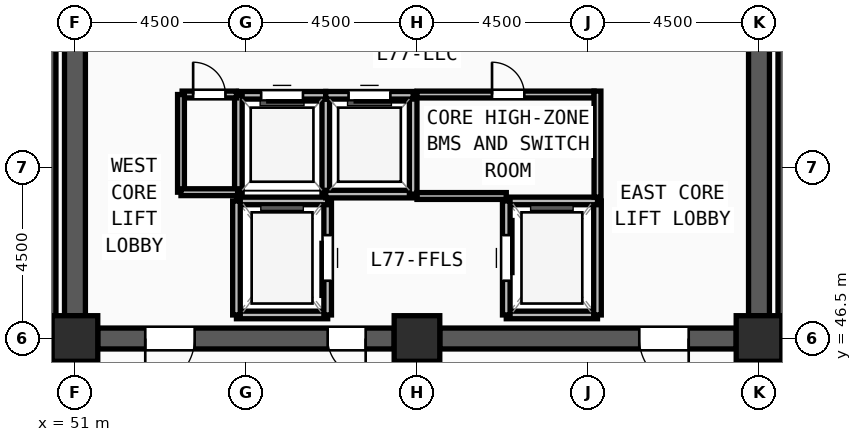
"""IFC4 building model, lengths in metres.
Left out: names, types, materials, properties, quantities, classifications, styles, units other than length and angle.
Written with IfcOpenShell. Run it as: python <this file> out.ifc"""

import sys

from ifc_helpers import new_model, si_unit, direction, frame, frame_2d, origin, origin_2d, place, context, subcontext, project, spatial, rectangle, extrude, source, transform, mapped, element, fill, save


model = new_model("IFC4")
c1 = context("Model", 3, precision=1e-05, world=origin(), true_north=direction((0.0, 1.0)))
c2 = subcontext(c1, "Body", "Model", "MODEL_VIEW")
j1 = project(units=[si_unit("LENGTHUNIT", "METRE"), si_unit("PLANEANGLEUNIT", "RADIAN")], contexts=[c1])
p1 = place(None, origin())
s1 = spatial("IfcSite", under=j1, at=p1, CompositionType="ELEMENT")
p2 = place(p1, origin())
s2 = spatial("IfcBuilding", under=s1, at=p2, CompositionType="ELEMENT")
p3 = place(p2, frame((0.0, 0.0, 297.75)))
s3 = spatial("IfcBuildingStorey", under=s2, at=p3, CompositionType="ELEMENT", Elevation=297.75)
m1 = source(origin(), c2, "Body", "SweptSolid", [
    extrude(rectangle(XDim=1.2, YDim=1.2, at=origin_2d()), origin(), (0.0, 0.0, 1.0), 3.75),
])
for number, where, z_axis, x_axis in (
    (1, (51.0, 46.5, 0.0), (0.0, 0.0, 1.0), (1.0, 0.0, 0.0)),
    (2, (60.0, 46.5, 0.0), (0.0, 0.0, 1.0), (1.0, 0.0, 0.0)),
    (3, (69.0, 46.5, 0.0), (0.0, 0.0, 1.0), (1.0, 0.0, 0.0)),
):
    element("IfcColumn", number, at=place(p3, frame(where, z_axis=z_axis, x_axis=x_axis)), inside=s3, PredefinedType="COLUMN", context=c2, shape_type="MappedRepresentation", body=[
        mapped(m1, transform((0.0, 0.0, 0.0), x_axis=(1.0, 0.0, 0.0), y_axis=(0.0, 1.0, 0.0), z_axis=(0.0, 0.0, 1.0), scale=1.0)),
    ])
p4 = place(p3, frame((69.0, 60.9, 0.0), z_axis=(0.0, 0.0, 1.0), x_axis=(0.0, -1.0, 0.0)))
e4 = element("IfcWall", 4, at=p4, inside=s3, PredefinedType="SHEAR", context=c2, shape_type="SweptSolid", body=[
    extrude(rectangle(XDim=13.8, YDim=0.55, at=frame_2d((6.9, 0.0))), origin(), (0.0, 0.0, 1.0), 3.57),
])
m2 = source(origin(), c2, "Body", "SweptSolid", [
    extrude(rectangle(XDim=1.2, YDim=2.2, at=frame_2d((0.6, 1.1))), frame((0.0, 0.285, 0.0), z_axis=(0.0, -1.0, 0.0), x_axis=(1.0, 0.0, 0.0)), (0.0, 0.0, 1.0), 0.57),
])
p5 = place(p4, frame((1.35, 0.0, 0.0)))
e5 = element("IfcOpeningElement", 5, at=p5, cuts=e4, PredefinedType="OPENING", context=c2, shape_type="MappedRepresentation", body=[
    mapped(m2, transform((0.0, 0.0, 0.0), x_axis=(1.0, 0.0, 0.0), y_axis=(0.0, 1.0, 0.0), z_axis=(0.0, 0.0, 1.0), scale=1.0)),
])
p6 = place(p3, frame((68.4, 46.5, 0.0), z_axis=(0.0, 0.0, 1.0), x_axis=(-1.0, 0.0, 0.0)))
e6 = element("IfcWall", 6, at=p6, inside=s3, PredefinedType="SHEAR", context=c2, shape_type="SweptSolid", body=[
    extrude(rectangle(XDim=7.8, YDim=0.55, at=frame_2d((3.9, 0.0))), origin(), (0.0, 0.0, 1.0), 3.57),
])
m3 = source(origin(), c2, "Body", "SweptSolid", [
    extrude(rectangle(XDim=1.3, YDim=2.2, at=frame_2d((0.65, 1.1))), frame((0.0, 0.285, 0.0), z_axis=(0.0, -1.0, 0.0), x_axis=(1.0, 0.0, 0.0)), (0.0, 0.0, 1.0), 0.57),
])
p7 = place(p6, frame((1.25, 0.0, 0.0)))
e7 = element("IfcOpeningElement", 7, at=p7, cuts=e6, PredefinedType="OPENING", context=c2, shape_type="MappedRepresentation", body=[
    mapped(m3, transform((0.0, 0.0, 0.0), x_axis=(1.0, 0.0, 0.0), y_axis=(0.0, 1.0, 0.0), z_axis=(0.0, 0.0, 1.0), scale=1.0)),
])
p8 = place(p3, frame((59.4, 46.5, 0.0), z_axis=(0.0, 0.0, 1.0), x_axis=(-1.0, 0.0, 0.0)))
e8 = element("IfcWall", 8, at=p8, inside=s3, PredefinedType="SHEAR", context=c2, shape_type="SweptSolid", body=[
    extrude(rectangle(XDim=7.8, YDim=0.55, at=frame_2d((3.9, 0.0))), origin(), (0.0, 0.0, 1.0), 3.57),
])
p9 = place(p8, frame((5.25, 0.0, 0.0)))
e9 = element("IfcOpeningElement", 9, at=p9, cuts=e8, PredefinedType="OPENING", context=c2, shape_type="MappedRepresentation", body=[
    mapped(m3, transform((0.0, 0.0, 0.0), x_axis=(1.0, 0.0, 0.0), y_axis=(0.0, 1.0, 0.0), z_axis=(0.0, 0.0, 1.0), scale=1.0)),
])
m4 = source(origin(), c2, "Body", "SweptSolid", [
    extrude(rectangle(XDim=1.0, YDim=2.2, at=frame_2d((0.5, 1.1))), frame((0.0, 0.285, 0.0), z_axis=(0.0, -1.0, 0.0), x_axis=(1.0, 0.0, 0.0)), (0.0, 0.0, 1.0), 0.57),
])
p10 = place(p8, frame((0.75, 0.0, 0.0)))
e10 = element("IfcOpeningElement", 10, at=p10, cuts=e8, PredefinedType="OPENING", context=c2, shape_type="MappedRepresentation", body=[
    mapped(m4, transform((0.0, 0.0, 0.0), x_axis=(1.0, 0.0, 0.0), y_axis=(0.0, 1.0, 0.0), z_axis=(0.0, 0.0, 1.0), scale=1.0)),
])
p11 = place(p3, frame((51.0, 47.1, 0.0), z_axis=(0.0, 0.0, 1.0), x_axis=(0.0, 1.0, 0.0)))
e11 = element("IfcWall", 11, at=p11, inside=s3, PredefinedType="SHEAR", context=c2, shape_type="SweptSolid", body=[
    extrude(rectangle(XDim=13.8, YDim=0.55, at=frame_2d((6.9, 0.0))), origin(), (0.0, 0.0, 1.0), 3.57),
])
for number, where, z_axis, x_axis in (
    (12, (50.38, 46.7, 0.0), (0.0, 0.0, 1.0), (0.0, 1.0, 0.0)),
    (13, (69.62, 54.52, 0.0), (0.0, 0.0, 1.0), (0.0, -1.0, 0.0)),
):
    element("IfcWall", number, at=place(p3, frame(where, z_axis=z_axis, x_axis=x_axis)), inside=s3, PredefinedType="SOLIDWALL", context=c2, shape_type="SweptSolid", body=[
        extrude(rectangle(XDim=7.82, YDim=0.24, at=frame_2d((3.91, 0.0))), origin(), (0.0, 0.0, 1.0), 3.57),
    ])
p12 = place(p3, frame((55.25, 47.12, 0.0), z_axis=(0.0, 0.0, 1.0), x_axis=(1.0, 0.0, 0.0)))
e14 = element("IfcWall", 14, at=p12, inside=s3, PredefinedType="SOLIDWALL", context=c2, shape_type="SweptSolid", body=[
    extrude(rectangle(XDim=2.4, YDim=0.2, at=frame_2d((1.2, 0.0))), origin(), (0.0, 0.0, 1.0), 3.57),
])
p13 = place(p3, frame((57.65, 47.12, 0.0), z_axis=(0.0, 0.0, 1.0), x_axis=(0.0, 1.0, 0.0)))
e15 = element("IfcWall", 15, at=p13, inside=s3, PredefinedType="SOLIDWALL", context=c2, shape_type="SweptSolid", body=[
    extrude(rectangle(XDim=3.0, YDim=0.2, at=frame_2d((1.5, 0.0))), origin(), (0.0, 0.0, 1.0), 3.57),
])
m5 = source(origin(), c2, "Body", "SweptSolid", [
    extrude(rectangle(XDim=1.2, YDim=2.3, at=frame_2d((0.6, 1.15))), frame((0.0, 0.11, 0.0), z_axis=(0.0, -1.0, 0.0), x_axis=(1.0, 0.0, 0.0)), (0.0, 0.0, 1.0), 0.22),
])
p14 = place(p13, frame((0.9, 0.0, 0.0)))
e16 = element("IfcOpeningElement", 16, at=p14, cuts=e15, PredefinedType="OPENING", context=c2, shape_type="MappedRepresentation", body=[
    mapped(m5, transform((0.0, 0.0, 0.0), x_axis=(1.0, 0.0, 0.0), y_axis=(0.0, 1.0, 0.0), z_axis=(0.0, 0.0, 1.0), scale=1.0)),
])
p15 = place(p3, frame((57.65, 50.12, 0.0), z_axis=(0.0, 0.0, 1.0), x_axis=(-1.0, 0.0, 0.0)))
e17 = element("IfcWall", 17, at=p15, inside=s3, PredefinedType="SOLIDWALL", context=c2, shape_type="SweptSolid", body=[
    extrude(rectangle(XDim=2.4, YDim=0.2, at=frame_2d((1.2, 0.0))), origin(), (0.0, 0.0, 1.0), 3.57),
])
p16 = place(p3, frame((55.25, 50.12, 0.0), z_axis=(0.0, 0.0, 1.0), x_axis=(0.0, -1.0, 0.0)))
e18 = element("IfcWall", 18, at=p16, inside=s3, PredefinedType="SOLIDWALL", context=c2, shape_type="SweptSolid", body=[
    extrude(rectangle(XDim=3.0, YDim=0.2, at=frame_2d((1.5, 0.0))), origin(), (0.0, 0.0, 1.0), 3.57),
])
p17 = place(p3, frame((62.35, 47.12, 0.0), z_axis=(0.0, 0.0, 1.0), x_axis=(1.0, 0.0, 0.0)))
e19 = element("IfcWall", 19, at=p17, inside=s3, PredefinedType="SOLIDWALL", context=c2, shape_type="SweptSolid", body=[
    extrude(rectangle(XDim=2.4, YDim=0.2, at=frame_2d((1.2, 0.0))), origin(), (0.0, 0.0, 1.0), 3.57),
])
p18 = place(p3, frame((64.75, 47.12, 0.0), z_axis=(0.0, 0.0, 1.0), x_axis=(0.0, 1.0, 0.0)))
e20 = element("IfcWall", 20, at=p18, inside=s3, PredefinedType="SOLIDWALL", context=c2, shape_type="SweptSolid", body=[
    extrude(rectangle(XDim=3.0, YDim=0.2, at=frame_2d((1.5, 0.0))), origin(), (0.0, 0.0, 1.0), 3.57),
])
p19 = place(p3, frame((64.75, 50.12, 0.0), z_axis=(0.0, 0.0, 1.0), x_axis=(-1.0, 0.0, 0.0)))
e21 = element("IfcWall", 21, at=p19, inside=s3, PredefinedType="SOLIDWALL", context=c2, shape_type="SweptSolid", body=[
    extrude(rectangle(XDim=2.4, YDim=0.2, at=frame_2d((1.2, 0.0))), origin(), (0.0, 0.0, 1.0), 3.57),
])
p20 = place(p3, frame((62.35, 50.12, 0.0), z_axis=(0.0, 0.0, 1.0), x_axis=(0.0, -1.0, 0.0)))
e22 = element("IfcWall", 22, at=p20, inside=s3, PredefinedType="SOLIDWALL", context=c2, shape_type="SweptSolid", body=[
    extrude(rectangle(XDim=3.0, YDim=0.2, at=frame_2d((1.5, 0.0))), origin(), (0.0, 0.0, 1.0), 3.57),
])
p21 = place(p20, frame((0.9, 0.0, 0.0)))
e23 = element("IfcOpeningElement", 23, at=p21, cuts=e22, PredefinedType="OPENING", context=c2, shape_type="MappedRepresentation", body=[
    mapped(m5, transform((0.0, 0.0, 0.0), x_axis=(1.0, 0.0, 0.0), y_axis=(0.0, 1.0, 0.0), z_axis=(0.0, 0.0, 1.0), scale=1.0)),
])
p22 = place(p3, frame((57.6, 50.3, 0.0), z_axis=(0.0, 0.0, 1.0), x_axis=(0.0, 1.0, 0.0)))
e24 = element("IfcWall", 24, at=p22, inside=s3, PredefinedType="SOLIDWALL", context=c2, shape_type="SweptSolid", body=[
    extrude(rectangle(XDim=2.6, YDim=0.2, at=frame_2d((1.3, 0.0))), origin(), (0.0, 0.0, 1.0), 3.57),
])
p23 = place(p3, frame((57.6, 52.9, 0.0), z_axis=(0.0, 0.0, 1.0), x_axis=(-1.0, 0.0, 0.0)))
e25 = element("IfcWall", 25, at=p23, inside=s3, PredefinedType="SOLIDWALL", context=c2, shape_type="SweptSolid", body=[
    extrude(rectangle(XDim=2.3, YDim=0.2, at=frame_2d((1.15, 0.0))), origin(), (0.0, 0.0, 1.0), 3.57),
])
m6 = source(origin(), c2, "Body", "SweptSolid", [
    extrude(rectangle(XDim=1.1, YDim=2.2, at=frame_2d((0.55, 1.1))), frame((0.0, 0.11, 0.0), z_axis=(0.0, -1.0, 0.0), x_axis=(1.0, 0.0, 0.0)), (0.0, 0.0, 1.0), 0.22),
])
p24 = place(p23, frame((0.6, 0.0, 0.0)))
e26 = element("IfcOpeningElement", 26, at=p24, cuts=e25, PredefinedType="OPENING", context=c2, shape_type="MappedRepresentation", body=[
    mapped(m6, transform((0.0, 0.0, 0.0), x_axis=(1.0, 0.0, 0.0), y_axis=(0.0, 1.0, 0.0), z_axis=(0.0, 0.0, 1.0), scale=1.0)),
])
p25 = place(p3, frame((55.3, 52.9, 0.0), z_axis=(0.0, 0.0, 1.0), x_axis=(0.0, -1.0, 0.0)))
e27 = element("IfcWall", 27, at=p25, inside=s3, PredefinedType="SOLIDWALL", context=c2, shape_type="SweptSolid", body=[
    extrude(rectangle(XDim=2.6, YDim=0.2, at=frame_2d((1.3, 0.0))), origin(), (0.0, 0.0, 1.0), 3.57),
])
p26 = place(p3, frame((57.6, 50.3, 0.0), z_axis=(0.0, 0.0, 1.0), x_axis=(1.0, 0.0, 0.0)))
e28 = element("IfcWall", 28, at=p26, inside=s3, PredefinedType="SOLIDWALL", context=c2, shape_type="SweptSolid", body=[
    extrude(rectangle(XDim=2.3, YDim=0.2, at=frame_2d((1.15, 0.0))), origin(), (0.0, 0.0, 1.0), 3.57),
])
p27 = place(p3, frame((59.9, 50.3, 0.0), z_axis=(0.0, 0.0, 1.0), x_axis=(0.0, 1.0, 0.0)))
e29 = element("IfcWall", 29, at=p27, inside=s3, PredefinedType="SOLIDWALL", context=c2, shape_type="SweptSolid", body=[
    extrude(rectangle(XDim=2.6, YDim=0.2, at=frame_2d((1.3, 0.0))), origin(), (0.0, 0.0, 1.0), 3.57),
])
p28 = place(p3, frame((59.9, 52.9, 0.0), z_axis=(0.0, 0.0, 1.0), x_axis=(-1.0, 0.0, 0.0)))
e30 = element("IfcWall", 30, at=p28, inside=s3, PredefinedType="SOLIDWALL", context=c2, shape_type="SweptSolid", body=[
    extrude(rectangle(XDim=2.3, YDim=0.2, at=frame_2d((1.15, 0.0))), origin(), (0.0, 0.0, 1.0), 3.57),
])
p29 = place(p28, frame((0.6, 0.0, 0.0)))
e31 = element("IfcOpeningElement", 31, at=p29, cuts=e30, PredefinedType="OPENING", context=c2, shape_type="MappedRepresentation", body=[
    mapped(m6, transform((0.0, 0.0, 0.0), x_axis=(1.0, 0.0, 0.0), y_axis=(0.0, 1.0, 0.0), z_axis=(0.0, 0.0, 1.0), scale=1.0)),
])
p30 = place(p3, frame((60.0, 52.92, 0.0), z_axis=(0.0, 0.0, 1.0), x_axis=(1.0, 0.0, 0.0)))
e32 = element("IfcWall", 32, at=p30, inside=s3, PredefinedType="PARTITIONING", context=c2, shape_type="SweptSolid", body=[
    extrude(rectangle(XDim=4.66, YDim=0.18, at=frame_2d((2.33, 0.0))), origin(), (0.0, 0.0, 1.0), 3.57),
])
m7 = source(origin(), c2, "Body", "SweptSolid", [
    extrude(rectangle(XDim=0.85, YDim=2.1, at=frame_2d((0.425, 1.05))), frame((0.0, 0.1, 0.0), z_axis=(0.0, -1.0, 0.0), x_axis=(1.0, 0.0, 0.0)), (0.0, 0.0, 1.0), 0.2),
])
p31 = place(p30, frame((1.975, 0.0, 0.0)))
e33 = element("IfcOpeningElement", 33, at=p31, cuts=e32, PredefinedType="OPENING", context=c2, shape_type="MappedRepresentation", body=[
    mapped(m7, transform((0.0, 0.0, 0.0), x_axis=(1.0, 0.0, 0.0), y_axis=(0.0, 1.0, 0.0), z_axis=(0.0, 0.0, 1.0), scale=1.0)),
])
p32 = place(p3, frame((53.82, 52.92, 0.0), z_axis=(0.0, 0.0, 1.0), x_axis=(1.0, 0.0, 0.0)))
e34 = element("IfcWall", 34, at=p32, inside=s3, PredefinedType="PARTITIONING", context=c2, shape_type="SweptSolid", body=[
    extrude(rectangle(XDim=1.43, YDim=0.18, at=frame_2d((0.715, 0.0))), origin(), (0.0, 0.0, 1.0), 3.57),
])
p33 = place(p32, frame((0.29, 0.0, 0.0)))
e35 = element("IfcOpeningElement", 35, at=p33, cuts=e34, PredefinedType="OPENING", context=c2, shape_type="MappedRepresentation", body=[
    mapped(m7, transform((0.0, 0.0, 0.0), x_axis=(1.0, 0.0, 0.0), y_axis=(0.0, 1.0, 0.0), z_axis=(0.0, 0.0, 1.0), scale=1.0)),
])
p34 = place(p3, frame((53.79, 50.35, 0.0), z_axis=(0.0, 0.0, 1.0), x_axis=(0.0, 1.0, 0.0)))
e36 = element("IfcWall", 36, at=p34, inside=s3, PredefinedType="PARTITIONING", context=c2, shape_type="SweptSolid", body=[
    extrude(rectangle(XDim=2.57, YDim=0.18, at=frame_2d((1.285, 0.0))), origin(), (0.0, 0.0, 1.0), 3.57),
])
p35 = place(p3, frame((53.79, 50.35, 0.0), z_axis=(0.0, 0.0, 1.0), x_axis=(1.0, 0.0, 0.0)))
e37 = element("IfcWall", 37, at=p35, inside=s3, PredefinedType="PARTITIONING", context=c2, shape_type="SweptSolid", body=[
    extrude(rectangle(XDim=1.49, YDim=0.18, at=frame_2d((0.745, 0.0))), origin(), (0.0, 0.0, 1.0), 3.57),
])
p36 = place(p3, frame((64.75, 50.22, 0.0), z_axis=(0.0, 0.0, 1.0), x_axis=(0.0, 1.0, 0.0)))
e38 = element("IfcWall", 38, at=p36, inside=s3, PredefinedType="PARTITIONING", context=c2, shape_type="SweptSolid", body=[
    extrude(rectangle(XDim=2.79, YDim=0.18, at=frame_2d((1.395, 0.0))), origin(), (0.0, 0.0, 1.0), 3.57),
])
p37 = place(p3, frame((60.0, 50.25, 0.0), z_axis=(0.0, 0.0, 1.0), x_axis=(1.0, 0.0, 0.0)))
e39 = element("IfcWall", 39, at=p37, inside=s3, PredefinedType="PARTITIONING", context=c2, shape_type="SweptSolid", body=[
    extrude(rectangle(XDim=2.35, YDim=0.18, at=frame_2d((1.175, 0.0))), origin(), (0.0, 0.0, 1.0), 3.57),
])
m8 = source(origin(), c2, "Body", "SweptSolid", [
    extrude(rectangle(XDim=1.3, YDim=2.2, at=frame_2d((0.65, 1.1))), frame((0.0, 0.025, 0.0), z_axis=(0.0, -1.0, 0.0), x_axis=(1.0, 0.0, 0.0)), (0.0, 0.0, 1.0), 0.05),
])
p38 = place(p9, origin())
e40 = element("IfcDoor", 40, at=p38, inside=s3, OperationType="SINGLE_SWING_RIGHT", PredefinedType="DOOR", context=c2, shape_type="MappedRepresentation", body=[
    mapped(m8, transform((0.0, 0.0, 0.0), x_axis=(1.0, 0.0, 0.0), y_axis=(0.0, 1.0, 0.0), z_axis=(0.0, 0.0, 1.0), scale=1.0)),
])
fill(e9, e40)
m9 = source(origin(), c2, "Body", "SweptSolid", [
    extrude(rectangle(XDim=1.0, YDim=2.2, at=frame_2d((0.5, 1.1))), frame((0.0, 0.025, 0.0), z_axis=(0.0, -1.0, 0.0), x_axis=(1.0, 0.0, 0.0)), (0.0, 0.0, 1.0), 0.05),
])
p39 = place(p10, origin())
e41 = element("IfcDoor", 41, at=p39, inside=s3, OperationType="SINGLE_SWING_LEFT", PredefinedType="DOOR", context=c2, shape_type="MappedRepresentation", body=[
    mapped(m9, transform((0.0, 0.0, 0.0), x_axis=(1.0, 0.0, 0.0), y_axis=(0.0, 1.0, 0.0), z_axis=(0.0, 0.0, 1.0), scale=1.0)),
])
fill(e10, e41)
p40 = place(p7, origin())
e42 = element("IfcDoor", 42, at=p40, inside=s3, OperationType="SINGLE_SWING_LEFT", PredefinedType="DOOR", context=c2, shape_type="MappedRepresentation", body=[
    mapped(m8, transform((0.0, 0.0, 0.0), x_axis=(1.0, 0.0, 0.0), y_axis=(0.0, 1.0, 0.0), z_axis=(0.0, 0.0, 1.0), scale=1.0)),
])
fill(e7, e42)
m10 = source(origin(), c2, "Body", "SweptSolid", [
    extrude(rectangle(XDim=1.2, YDim=2.3, at=frame_2d((0.6, 1.15))), frame((0.0, 0.025, 0.0), z_axis=(0.0, -1.0, 0.0), x_axis=(1.0, 0.0, 0.0)), (0.0, 0.0, 1.0), 0.05),
])
p41 = place(p14, origin())
e43 = element("IfcDoor", 43, at=p41, inside=s3, OperationType="SLIDING_TO_LEFT", PredefinedType="DOOR", context=c2, shape_type="MappedRepresentation", body=[
    mapped(m10, transform((0.0, 0.0, 0.0), x_axis=(1.0, 0.0, 0.0), y_axis=(0.0, 1.0, 0.0), z_axis=(0.0, 0.0, 1.0), scale=1.0)),
])
fill(e16, e43)
p42 = place(p21, origin())
e44 = element("IfcDoor", 44, at=p42, inside=s3, OperationType="SLIDING_TO_LEFT", PredefinedType="DOOR", context=c2, shape_type="MappedRepresentation", body=[
    mapped(m10, transform((0.0, 0.0, 0.0), x_axis=(1.0, 0.0, 0.0), y_axis=(0.0, 1.0, 0.0), z_axis=(0.0, 0.0, 1.0), scale=1.0)),
])
fill(e23, e44)
m11 = source(origin(), c2, "Body", "SweptSolid", [
    extrude(rectangle(XDim=1.1, YDim=2.2, at=frame_2d((0.55, 1.1))), frame((0.0, 0.025, 0.0), z_axis=(0.0, -1.0, 0.0), x_axis=(1.0, 0.0, 0.0)), (0.0, 0.0, 1.0), 0.05),
])
p43 = place(p24, origin())
e45 = element("IfcDoor", 45, at=p43, inside=s3, OperationType="SLIDING_TO_LEFT", PredefinedType="DOOR", context=c2, shape_type="MappedRepresentation", body=[
    mapped(m11, transform((0.0, 0.0, 0.0), x_axis=(1.0, 0.0, 0.0), y_axis=(0.0, 1.0, 0.0), z_axis=(0.0, 0.0, 1.0), scale=1.0)),
])
fill(e26, e45)
p44 = place(p29, origin())
e46 = element("IfcDoor", 46, at=p44, inside=s3, OperationType="SLIDING_TO_LEFT", PredefinedType="DOOR", context=c2, shape_type="MappedRepresentation", body=[
    mapped(m11, transform((0.0, 0.0, 0.0), x_axis=(1.0, 0.0, 0.0), y_axis=(0.0, 1.0, 0.0), z_axis=(0.0, 0.0, 1.0), scale=1.0)),
])
fill(e31, e46)
m12 = source(origin(), c2, "Body", "SweptSolid", [
    extrude(rectangle(XDim=0.85, YDim=2.1, at=frame_2d((0.425, 1.05))), frame((0.0, 0.025, 0.0), z_axis=(0.0, -1.0, 0.0), x_axis=(1.0, 0.0, 0.0)), (0.0, 0.0, 1.0), 0.05),
])
p45 = place(p31, origin())
e47 = element("IfcDoor", 47, at=p45, inside=s3, OperationType="SINGLE_SWING_LEFT", PredefinedType="DOOR", context=c2, shape_type="MappedRepresentation", body=[
    mapped(m12, transform((0.0, 0.0, 0.0), x_axis=(1.0, 0.0, 0.0), y_axis=(0.0, 1.0, 0.0), z_axis=(0.0, 0.0, 1.0), scale=1.0)),
])
fill(e33, e47)
p46 = place(p33, origin())
e48 = element("IfcDoor", 48, at=p46, inside=s3, OperationType="SINGLE_SWING_LEFT", PredefinedType="DOOR", context=c2, shape_type="MappedRepresentation", body=[
    mapped(m12, transform((0.0, 0.0, 0.0), x_axis=(1.0, 0.0, 0.0), y_axis=(0.0, 1.0, 0.0), z_axis=(0.0, 0.0, 1.0), scale=1.0)),
])
fill(e35, e48)
save(model, sys.argv[1])
